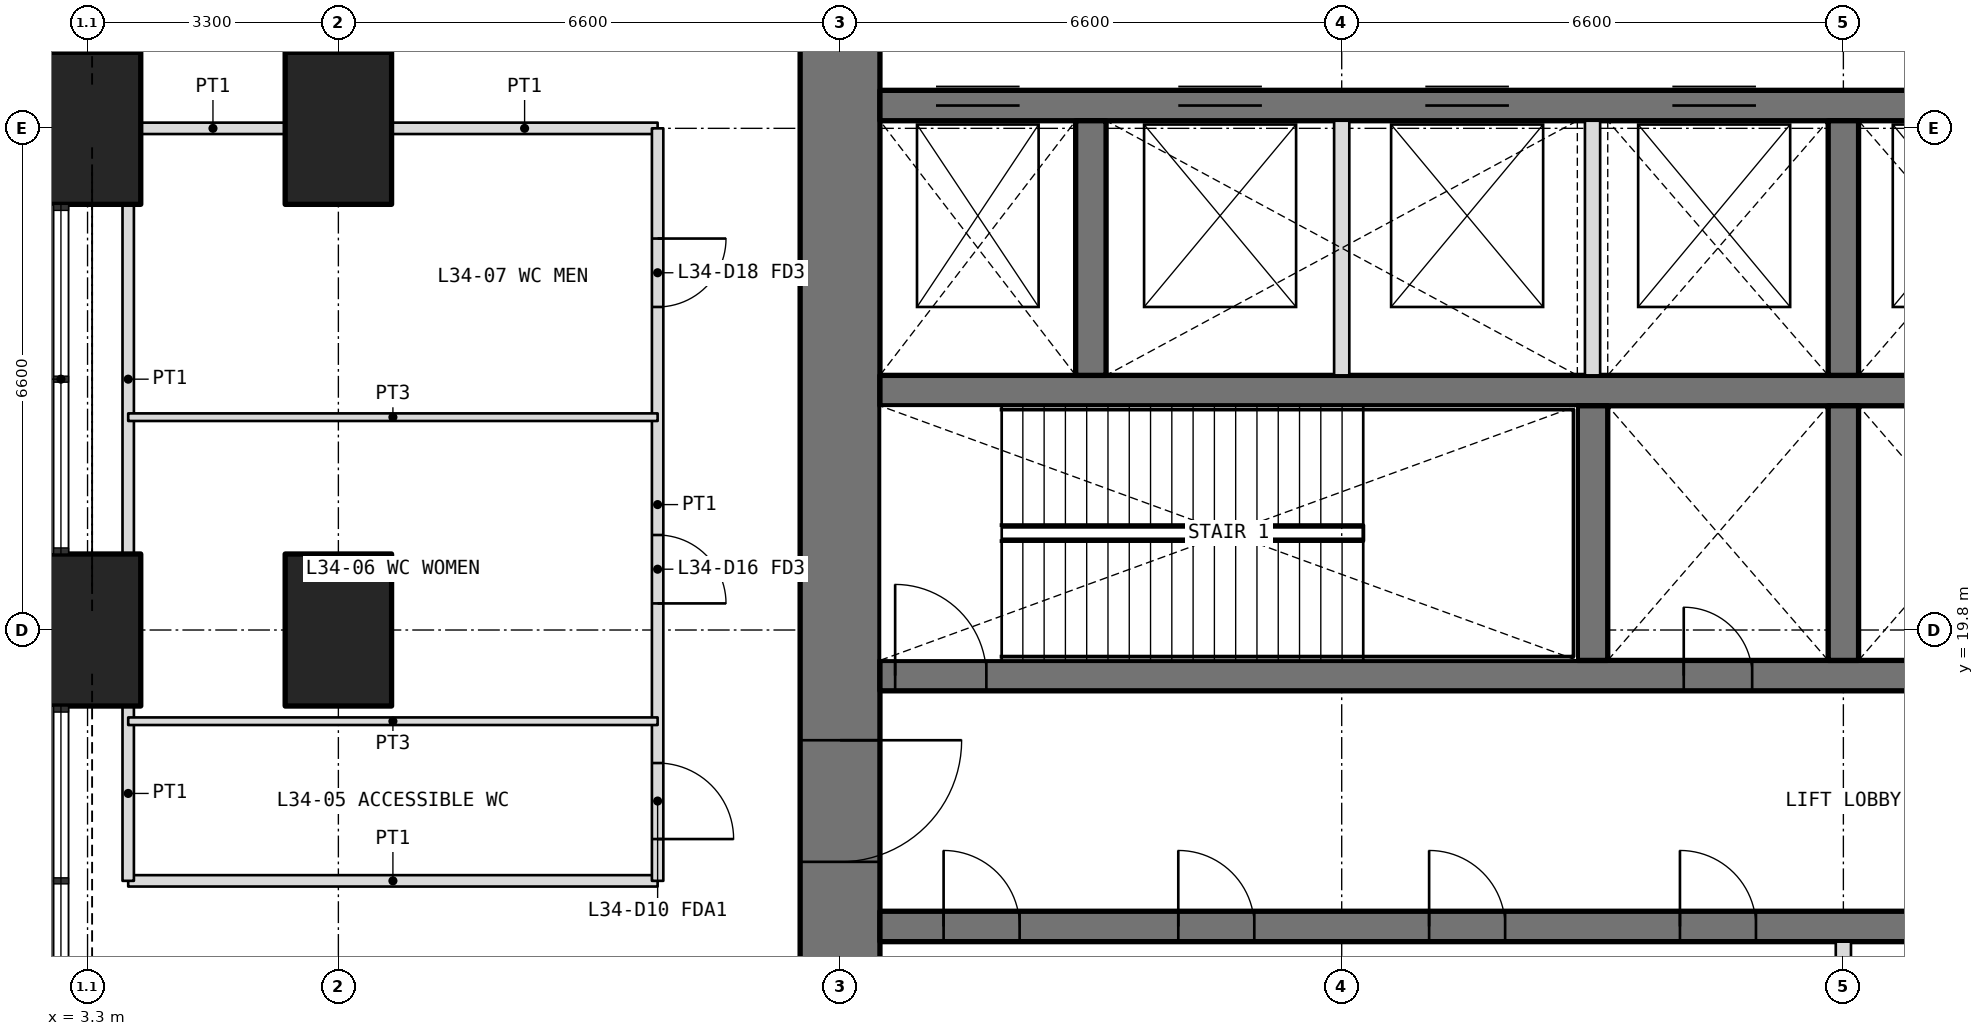
"""IFC4 building model, lengths in metres.
Left out: names, types, materials, properties, quantities, classifications, styles, units other than length and angle.
Written with IfcOpenShell. Run it as: python <this file> out.ifc"""

import sys

from ifc_helpers import new_model, si_unit, direction, frame, frame_2d, origin, origin_2d, place, context, subcontext, project, spatial, rectangle, extrude, element, fill, save


model = new_model("IFC4")
c1 = context("Model", 3, precision=1e-05, world=origin(), true_north=direction((0.0, 1.0)))
c2 = subcontext(c1, "Body", "Model", "MODEL_VIEW")
j1 = project(units=[si_unit("LENGTHUNIT", "METRE"), si_unit("PLANEANGLEUNIT", "RADIAN")], contexts=[c1])
p1 = place(None, origin())
s1 = spatial("IfcSite", under=j1, at=p1, CompositionType="ELEMENT")
p2 = place(p1, origin())
s2 = spatial("IfcBuilding", under=s1, at=p2, CompositionType="ELEMENT")
p3 = place(p2, frame((0.0, 0.0, 149.4)))
s3 = spatial("IfcBuildingStorey", under=s2, at=p3, CompositionType="ELEMENT", Elevation=149.4)
for number, where, z_axis, x_axis in (
    (1, (3.3, 19.8, 0.0), (0.0, 0.0, 1.0), (0.0, 1.0, 0.0)),
    (2, (3.3, 26.4, 0.0), (0.0, 0.0, 1.0), (0.0, 1.0, 0.0)),
    (3, (6.6, 19.8, 0.0), (0.0, 0.0, 1.0), (0.0, 1.0, 0.0)),
    (4, (6.6, 26.4, 0.0), (0.0, 0.0, 1.0), (0.0, 1.0, 0.0)),
):
    element("IfcColumn", number, at=place(p3, frame(where, z_axis=z_axis, x_axis=x_axis)), inside=s3, PredefinedType="COLUMN", context=c2, shape_type="SweptSolid", body=[
        extrude(rectangle(XDim=2.0, YDim=1.4, at=origin_2d()), origin(), (0.0, 0.0, 1.0), 6.3),
    ])
p4 = place(p3, frame((13.2, 32.475, 0.0), z_axis=(0.0, 0.0, 1.0), x_axis=(0.0, -1.0, 0.0)))
e5 = element("IfcWall", 5, at=p4, inside=s3, PredefinedType="SHEAR", context=c2, shape_type="SweptSolid", body=[
    extrude(rectangle(XDim=18.75, YDim=1.05, at=frame_2d((9.375, 0.0))), origin(), (0.0, 0.0, 1.0), 6.3),
])
p5 = place(p4, frame((14.125, 0.0, 0.0)))
e6 = element("IfcOpeningElement", 6, at=p5, cuts=e5, PredefinedType="OPENING", context=c2, shape_type="SweptSolid", body=[
    extrude(rectangle(XDim=1.6, YDim=2.1, at=frame_2d((0.8, 1.05))), frame((0.0, 0.535, 0.0), z_axis=(0.0, -1.0, 0.0), x_axis=(1.0, 0.0, 0.0)), (0.0, 0.0, 1.0), 1.07),
])
p6 = place(p4, frame((3.325, 0.0, 0.0)))
e7 = element("IfcOpeningElement", 7, at=p6, cuts=e5, PredefinedType="OPENING", context=c2, shape_type="SweptSolid", body=[
    extrude(rectangle(XDim=1.6, YDim=2.1, at=frame_2d((0.8, 1.05))), frame((0.0, 0.535, 0.0), z_axis=(0.0, -1.0, 0.0), x_axis=(1.0, 0.0, 0.0)), (0.0, 0.0, 1.0), 1.07),
])
p7 = place(p3, frame((13.725, 15.9, 0.0), z_axis=(0.0, 0.0, 1.0), x_axis=(1.0, 0.0, 0.0)))
e8 = element("IfcWall", 8, at=p7, inside=s3, PredefinedType="SHEAR", context=c2, shape_type="SweptSolid", body=[
    extrude(rectangle(XDim=25.35, YDim=0.4, at=frame_2d((12.675, 0.0))), origin(), (0.0, 0.0, 1.0), 6.3),
])
p8 = place(p7, frame((0.837, 0.0, 0.0)))
e9 = element("IfcOpeningElement", 9, at=p8, cuts=e8, PredefinedType="OPENING", context=c2, shape_type="SweptSolid", body=[
    extrude(rectangle(XDim=1.0, YDim=2.1, at=frame_2d((0.5, 1.05))), frame((0.0, 0.21, 0.0), z_axis=(0.0, -1.0, 0.0), x_axis=(1.0, 0.0, 0.0)), (0.0, 0.0, 1.0), 0.42),
])
p9 = place(p7, frame((3.925, 0.0, 0.0)))
e10 = element("IfcOpeningElement", 10, at=p9, cuts=e8, PredefinedType="OPENING", context=c2, shape_type="SweptSolid", body=[
    extrude(rectangle(XDim=1.0, YDim=2.1, at=frame_2d((0.5, 1.05))), frame((0.0, 0.21, 0.0), z_axis=(0.0, -1.0, 0.0), x_axis=(1.0, 0.0, 0.0)), (0.0, 0.0, 1.0), 0.42),
])
p10 = place(p7, frame((7.225, 0.0, 0.0)))
e11 = element("IfcOpeningElement", 11, at=p10, cuts=e8, PredefinedType="OPENING", context=c2, shape_type="SweptSolid", body=[
    extrude(rectangle(XDim=1.0, YDim=2.1, at=frame_2d((0.5, 1.05))), frame((0.0, 0.21, 0.0), z_axis=(0.0, -1.0, 0.0), x_axis=(1.0, 0.0, 0.0)), (0.0, 0.0, 1.0), 0.42),
])
p11 = place(p7, frame((10.525, 0.0, 0.0)))
e12 = element("IfcOpeningElement", 12, at=p11, cuts=e8, PredefinedType="OPENING", context=c2, shape_type="SweptSolid", body=[
    extrude(rectangle(XDim=1.0, YDim=2.1, at=frame_2d((0.5, 1.05))), frame((0.0, 0.21, 0.0), z_axis=(0.0, -1.0, 0.0), x_axis=(1.0, 0.0, 0.0)), (0.0, 0.0, 1.0), 0.42),
])
p12 = place(p3, frame((13.725, 19.2, 0.0), z_axis=(0.0, 0.0, 1.0), x_axis=(1.0, 0.0, 0.0)))
e13 = element("IfcWall", 13, at=p12, inside=s3, PredefinedType="SHEAR", context=c2, shape_type="SweptSolid", body=[
    extrude(rectangle(XDim=25.35, YDim=0.4, at=frame_2d((12.675, 0.0))), origin(), (0.0, 0.0, 1.0), 6.3),
])
p13 = place(p12, frame((10.575, 0.0, 0.0)))
e14 = element("IfcOpeningElement", 14, at=p13, cuts=e13, PredefinedType="OPENING", context=c2, shape_type="SweptSolid", body=[
    extrude(rectangle(XDim=0.9, YDim=2.1, at=frame_2d((0.45, 1.05))), frame((0.0, 0.21, 0.0), z_axis=(0.0, -1.0, 0.0), x_axis=(1.0, 0.0, 0.0)), (0.0, 0.0, 1.0), 0.42),
])
p14 = place(p12, frame((13.875, 0.0, 0.0)))
e15 = element("IfcOpeningElement", 15, at=p14, cuts=e13, PredefinedType="OPENING", context=c2, shape_type="SweptSolid", body=[
    extrude(rectangle(XDim=0.9, YDim=2.1, at=frame_2d((0.45, 1.05))), frame((0.0, 0.21, 0.0), z_axis=(0.0, -1.0, 0.0), x_axis=(1.0, 0.0, 0.0)), (0.0, 0.0, 1.0), 0.42),
])
p15 = place(p12, frame((0.2, 0.0, 0.0)))
e16 = element("IfcOpeningElement", 16, at=p15, cuts=e13, PredefinedType="OPENING", context=c2, shape_type="SweptSolid", body=[
    extrude(rectangle(XDim=1.2, YDim=2.1, at=frame_2d((0.6, 1.05))), frame((0.0, 0.21, 0.0), z_axis=(0.0, -1.0, 0.0), x_axis=(1.0, 0.0, 0.0)), (0.0, 0.0, 1.0), 0.42),
])
p16 = place(p12, frame((23.512, 0.0, 0.0)))
e17 = element("IfcOpeningElement", 17, at=p16, cuts=e13, PredefinedType="OPENING", context=c2, shape_type="SweptSolid", body=[
    extrude(rectangle(XDim=1.1, YDim=2.1, at=frame_2d((0.55, 1.05))), frame((0.0, 0.21, 0.0), z_axis=(0.0, -1.0, 0.0), x_axis=(1.0, 0.0, 0.0)), (0.0, 0.0, 1.0), 0.42),
])
p17 = place(p12, frame((17.125, 0.0, 0.0)))
e18 = element("IfcOpeningElement", 18, at=p17, cuts=e13, PredefinedType="OPENING", context=c2, shape_type="SweptSolid", body=[
    extrude(rectangle(XDim=1.1, YDim=2.1, at=frame_2d((0.55, 1.05))), frame((0.0, 0.21, 0.0), z_axis=(0.0, -1.0, 0.0), x_axis=(1.0, 0.0, 0.0)), (0.0, 0.0, 1.0), 0.42),
])
p18 = place(p12, frame((20.325, 0.0, 0.0)))
e19 = element("IfcOpeningElement", 19, at=p18, cuts=e13, PredefinedType="OPENING", context=c2, shape_type="SweptSolid", body=[
    extrude(rectangle(XDim=1.1, YDim=2.1, at=frame_2d((0.55, 1.05))), frame((0.0, 0.21, 0.0), z_axis=(0.0, -1.0, 0.0), x_axis=(1.0, 0.0, 0.0)), (0.0, 0.0, 1.0), 0.42),
])
p19 = place(p3, frame((13.725, 22.95, 0.0), z_axis=(0.0, 0.0, 1.0), x_axis=(1.0, 0.0, 0.0)))
e20 = element("IfcWall", 20, at=p19, inside=s3, PredefinedType="SHEAR", context=c2, shape_type="SweptSolid", body=[
    extrude(rectangle(XDim=25.35, YDim=0.4, at=frame_2d((12.675, 0.0))), origin(), (0.0, 0.0, 1.0), 6.3),
])
p20 = place(p3, frame((13.725, 26.7, 0.0), z_axis=(0.0, 0.0, 1.0), x_axis=(1.0, 0.0, 0.0)))
e21 = element("IfcWall", 21, at=p20, inside=s3, PredefinedType="SHEAR", context=c2, shape_type="SweptSolid", body=[
    extrude(rectangle(XDim=25.35, YDim=0.4, at=frame_2d((12.675, 0.0))), origin(), (0.0, 0.0, 1.0), 6.3),
])
p21 = place(p20, frame((23.95, 0.0, 0.0)))
e22 = element("IfcOpeningElement", 22, at=p21, cuts=e21, PredefinedType="OPENING", context=c2, shape_type="SweptSolid", body=[
    extrude(rectangle(XDim=1.2, YDim=2.1, at=frame_2d((0.6, 1.05))), frame((0.0, 0.21, 0.0), z_axis=(0.0, -1.0, 0.0), x_axis=(1.0, 0.0, 0.0)), (0.0, 0.0, 1.0), 0.42),
])
p22 = place(p20, frame((0.738, 0.0, 0.0)))
e23 = element("IfcOpeningElement", 23, at=p22, cuts=e21, PredefinedType="OPENING", context=c2, shape_type="SweptSolid", body=[
    extrude(rectangle(XDim=1.1, YDim=2.1, at=frame_2d((0.55, 1.05))), frame((0.0, 0.21, 0.0), z_axis=(0.0, -1.0, 0.0), x_axis=(1.0, 0.0, 0.0)), (0.0, 0.0, 1.0), 0.42),
])
p23 = place(p20, frame((3.925, 0.0, 0.0)))
e24 = element("IfcOpeningElement", 24, at=p23, cuts=e21, PredefinedType="OPENING", context=c2, shape_type="SweptSolid", body=[
    extrude(rectangle(XDim=1.1, YDim=2.1, at=frame_2d((0.55, 1.05))), frame((0.0, 0.21, 0.0), z_axis=(0.0, -1.0, 0.0), x_axis=(1.0, 0.0, 0.0)), (0.0, 0.0, 1.0), 0.42),
])
p24 = place(p20, frame((7.175, 0.0, 0.0)))
e25 = element("IfcOpeningElement", 25, at=p24, cuts=e21, PredefinedType="OPENING", context=c2, shape_type="SweptSolid", body=[
    extrude(rectangle(XDim=1.1, YDim=2.1, at=frame_2d((0.55, 1.05))), frame((0.0, 0.21, 0.0), z_axis=(0.0, -1.0, 0.0), x_axis=(1.0, 0.0, 0.0)), (0.0, 0.0, 1.0), 0.42),
])
p25 = place(p20, frame((10.425, 0.0, 0.0)))
e26 = element("IfcOpeningElement", 26, at=p25, cuts=e21, PredefinedType="OPENING", context=c2, shape_type="SweptSolid", body=[
    extrude(rectangle(XDim=1.1, YDim=2.1, at=frame_2d((0.55, 1.05))), frame((0.0, 0.21, 0.0), z_axis=(0.0, -1.0, 0.0), x_axis=(1.0, 0.0, 0.0)), (0.0, 0.0, 1.0), 0.42),
])
p26 = place(p20, frame((13.775, 0.0, 0.0)))
e27 = element("IfcOpeningElement", 27, at=p26, cuts=e21, PredefinedType="OPENING", context=c2, shape_type="SweptSolid", body=[
    extrude(rectangle(XDim=1.1, YDim=2.1, at=frame_2d((0.55, 1.05))), frame((0.0, 0.21, 0.0), z_axis=(0.0, -1.0, 0.0), x_axis=(1.0, 0.0, 0.0)), (0.0, 0.0, 1.0), 0.42),
])
for number, where, z_axis, x_axis in (
    (28, (23.1, 19.4, 0.0), (0.0, 0.0, 1.0), (0.0, 1.0, 0.0)),
    (29, (26.4, 19.4, 0.0), (0.0, 0.0, 1.0), (0.0, 1.0, 0.0)),
    (30, (16.5, 23.15, 0.0), (0.0, 0.0, 1.0), (0.0, 1.0, 0.0)),
    (31, (26.4, 23.15, 0.0), (0.0, 0.0, 1.0), (0.0, 1.0, 0.0)),
):
    element("IfcWall", number, at=place(p3, frame(where, z_axis=z_axis, x_axis=x_axis)), inside=s3, PredefinedType="SHEAR", context=c2, shape_type="SweptSolid", body=[
        extrude(rectangle(XDim=3.35, YDim=0.4, at=frame_2d((1.675, 0.0))), origin(), (0.0, 0.0, 1.0), 6.3),
    ])
p27 = place(p3, frame((26.4, 13.725, 0.0), z_axis=(0.0, 0.0, 1.0), x_axis=(0.0, 1.0, 0.0)))
e32 = element("IfcWall", 32, at=p27, inside=s3, PredefinedType="PARTITIONING", context=c2, shape_type="SweptSolid", body=[
    extrude(rectangle(XDim=1.975, YDim=0.2, at=frame_2d((0.987, 0.0))), origin(), (0.0, 0.0, 1.0), 6.3),
])
for number, where, z_axis, x_axis in (
    (33, (19.8, 23.15, 0.0), (0.0, 0.0, 1.0), (0.0, 1.0, 0.0)),
    (34, (23.1, 23.15, 0.0), (0.0, 0.0, 1.0), (0.0, 1.0, 0.0)),
):
    element("IfcWall", number, at=place(p3, frame(where, z_axis=z_axis, x_axis=x_axis)), inside=s3, PredefinedType="PARTITIONING", context=c2, shape_type="SweptSolid", body=[
        extrude(rectangle(XDim=3.35, YDim=0.2, at=frame_2d((1.675, 0.0))), origin(), (0.0, 0.0, 1.0), 6.3),
    ])
p28 = place(p3, frame((10.8, 16.5, 0.0), z_axis=(0.0, 0.0, 1.0), x_axis=(-1.0, 0.0, 0.0)))
e35 = element("IfcWall", 35, at=p28, inside=s3, PredefinedType="PARTITIONING", context=c2, shape_type="SweptSolid", body=[
    extrude(rectangle(XDim=6.965, YDim=0.15, at=frame_2d((3.482, 0.0))), origin(), (0.0, 0.0, 1.0), 4.0),
])
p29 = place(p3, frame((4.0, 26.4, 0.0), z_axis=(0.0, 0.0, 1.0), x_axis=(1.0, 0.0, 0.0)))
e36 = element("IfcWall", 36, at=p29, inside=s3, PredefinedType="PARTITIONING", context=c2, shape_type="SweptSolid", body=[
    extrude(rectangle(XDim=1.9, YDim=0.15, at=frame_2d((0.95, 0.0))), origin(), (0.0, 0.0, 1.0), 4.0),
])
p30 = place(p3, frame((7.3, 26.4, 0.0), z_axis=(0.0, 0.0, 1.0), x_axis=(1.0, 0.0, 0.0)))
e37 = element("IfcWall", 37, at=p30, inside=s3, PredefinedType="PARTITIONING", context=c2, shape_type="SweptSolid", body=[
    extrude(rectangle(XDim=3.5, YDim=0.15, at=frame_2d((1.75, 0.0))), origin(), (0.0, 0.0, 1.0), 4.0),
])
p31 = place(p3, frame((3.835, 16.5, 0.0), z_axis=(0.0, 0.0, 1.0), x_axis=(0.0, 1.0, 0.0)))
e38 = element("IfcWall", 38, at=p31, inside=s3, PredefinedType="PARTITIONING", context=c2, shape_type="SweptSolid", body=[
    extrude(rectangle(XDim=2.3, YDim=0.15, at=frame_2d((1.15, 0.0))), origin(), (0.0, 0.0, 1.0), 4.0),
])
p32 = place(p3, frame((3.835, 20.8, 0.0), z_axis=(0.0, 0.0, 1.0), x_axis=(0.0, 1.0, 0.0)))
e39 = element("IfcWall", 39, at=p32, inside=s3, PredefinedType="PARTITIONING", context=c2, shape_type="SweptSolid", body=[
    extrude(rectangle(XDim=4.6, YDim=0.15, at=frame_2d((2.3, 0.0))), origin(), (0.0, 0.0, 1.0), 4.0),
])
p33 = place(p3, frame((10.8, 26.4, 0.0), z_axis=(0.0, 0.0, 1.0), x_axis=(0.0, -1.0, 0.0)))
e40 = element("IfcWall", 40, at=p33, inside=s3, PredefinedType="PARTITIONING", context=c2, shape_type="SweptSolid", body=[
    extrude(rectangle(XDim=9.9, YDim=0.15, at=frame_2d((4.95, 0.0))), origin(), (0.0, 0.0, 1.0), 4.0),
])
p34 = place(p33, frame((8.35, 0.0, 0.0)))
e41 = element("IfcOpeningElement", 41, at=p34, cuts=e40, PredefinedType="OPENING", context=c2, shape_type="SweptSolid", body=[
    extrude(rectangle(XDim=1.0, YDim=2.1, at=frame_2d((0.5, 1.05))), frame((0.0, 0.085, 0.0), z_axis=(0.0, -1.0, 0.0), x_axis=(1.0, 0.0, 0.0)), (0.0, 0.0, 1.0), 0.17),
])
p35 = place(p33, frame((5.35, 0.0, 0.0)))
e42 = element("IfcOpeningElement", 42, at=p35, cuts=e40, PredefinedType="OPENING", context=c2, shape_type="SweptSolid", body=[
    extrude(rectangle(XDim=0.9, YDim=2.1, at=frame_2d((0.45, 1.05))), frame((0.0, 0.085, 0.0), z_axis=(0.0, -1.0, 0.0), x_axis=(1.0, 0.0, 0.0)), (0.0, 0.0, 1.0), 0.17),
])
p36 = place(p33, frame((1.45, 0.0, 0.0)))
e43 = element("IfcOpeningElement", 43, at=p36, cuts=e40, PredefinedType="OPENING", context=c2, shape_type="SweptSolid", body=[
    extrude(rectangle(XDim=0.9, YDim=2.1, at=frame_2d((0.45, 1.05))), frame((0.0, 0.085, 0.0), z_axis=(0.0, -1.0, 0.0), x_axis=(1.0, 0.0, 0.0)), (0.0, 0.0, 1.0), 0.17),
])
for number, where, z_axis, x_axis in (
    (44, (3.835, 18.6, 0.0), (0.0, 0.0, 1.0), (1.0, 0.0, 0.0)),
    (45, (3.835, 22.6, 0.0), (0.0, 0.0, 1.0), (1.0, 0.0, 0.0)),
):
    element("IfcWall", number, at=place(p3, frame(where, z_axis=z_axis, x_axis=x_axis)), inside=s3, PredefinedType="PARTITIONING", context=c2, shape_type="SweptSolid", body=[
        extrude(rectangle(XDim=6.965, YDim=0.1, at=frame_2d((3.482, 0.0))), origin(), (0.0, 0.0, 1.0), 4.0),
    ])
p37 = place(p34, origin())
e46 = element("IfcDoor", 46, at=p37, inside=s3, OperationType="SINGLE_SWING_RIGHT", PredefinedType="DOOR", context=c2, shape_type="SweptSolid", body=[
    extrude(rectangle(XDim=1.0, YDim=2.1, at=frame_2d((0.5, 1.05))), frame((0.0, 0.025, 0.0), z_axis=(0.0, -1.0, 0.0), x_axis=(1.0, 0.0, 0.0)), (0.0, 0.0, 1.0), 0.05),
])
fill(e41, e46)
p38 = place(p35, origin())
e47 = element("IfcDoor", 47, at=p38, inside=s3, OperationType="SINGLE_SWING_RIGHT", PredefinedType="DOOR", context=c2, shape_type="SweptSolid", body=[
    extrude(rectangle(XDim=0.9, YDim=2.1, at=frame_2d((0.45, 1.05))), frame((0.0, 0.025, 0.0), z_axis=(0.0, -1.0, 0.0), x_axis=(1.0, 0.0, 0.0)), (0.0, 0.0, 1.0), 0.05),
])
fill(e42, e47)
p39 = place(p36, origin())
e48 = element("IfcDoor", 48, at=p39, inside=s3, OperationType="SINGLE_SWING_LEFT", PredefinedType="DOOR", context=c2, shape_type="SweptSolid", body=[
    extrude(rectangle(XDim=0.9, YDim=2.1, at=frame_2d((0.45, 1.05))), frame((0.0, 0.025, 0.0), z_axis=(0.0, -1.0, 0.0), x_axis=(1.0, 0.0, 0.0)), (0.0, 0.0, 1.0), 0.05),
])
fill(e43, e48)
p40 = place(p13, origin())
e49 = element("IfcDoor", 49, at=p40, inside=s3, OperationType="SINGLE_SWING_LEFT", PredefinedType="DOOR", context=c2, shape_type="SweptSolid", body=[
    extrude(rectangle(XDim=0.9, YDim=2.1, at=frame_2d((0.45, 1.05))), frame((0.0, 0.025, 0.0), z_axis=(0.0, -1.0, 0.0), x_axis=(1.0, 0.0, 0.0)), (0.0, 0.0, 1.0), 0.05),
])
fill(e14, e49)
p41 = place(p8, origin())
e50 = element("IfcDoor", 50, at=p41, inside=s3, OperationType="SINGLE_SWING_LEFT", PredefinedType="DOOR", context=c2, shape_type="SweptSolid", body=[
    extrude(rectangle(XDim=1.0, YDim=2.1, at=frame_2d((0.5, 1.05))), frame((0.0, 0.025, 0.0), z_axis=(0.0, -1.0, 0.0), x_axis=(1.0, 0.0, 0.0)), (0.0, 0.0, 1.0), 0.05),
])
fill(e9, e50)
p42 = place(p9, origin())
e51 = element("IfcDoor", 51, at=p42, inside=s3, OperationType="SINGLE_SWING_LEFT", PredefinedType="DOOR", context=c2, shape_type="SweptSolid", body=[
    extrude(rectangle(XDim=1.0, YDim=2.1, at=frame_2d((0.5, 1.05))), frame((0.0, 0.025, 0.0), z_axis=(0.0, -1.0, 0.0), x_axis=(1.0, 0.0, 0.0)), (0.0, 0.0, 1.0), 0.05),
])
fill(e10, e51)
p43 = place(p10, origin())
e52 = element("IfcDoor", 52, at=p43, inside=s3, OperationType="SINGLE_SWING_LEFT", PredefinedType="DOOR", context=c2, shape_type="SweptSolid", body=[
    extrude(rectangle(XDim=1.0, YDim=2.1, at=frame_2d((0.5, 1.05))), frame((0.0, 0.025, 0.0), z_axis=(0.0, -1.0, 0.0), x_axis=(1.0, 0.0, 0.0)), (0.0, 0.0, 1.0), 0.05),
])
fill(e11, e52)
p44 = place(p11, origin())
e53 = element("IfcDoor", 53, at=p44, inside=s3, OperationType="SINGLE_SWING_LEFT", PredefinedType="DOOR", context=c2, shape_type="SweptSolid", body=[
    extrude(rectangle(XDim=1.0, YDim=2.1, at=frame_2d((0.5, 1.05))), frame((0.0, 0.025, 0.0), z_axis=(0.0, -1.0, 0.0), x_axis=(1.0, 0.0, 0.0)), (0.0, 0.0, 1.0), 0.05),
])
fill(e12, e53)
p45 = place(p15, origin())
e54 = element("IfcDoor", 54, at=p45, inside=s3, OperationType="SINGLE_SWING_LEFT", PredefinedType="DOOR", context=c2, shape_type="SweptSolid", body=[
    extrude(rectangle(XDim=1.2, YDim=2.1, at=frame_2d((0.6, 1.05))), frame((0.0, 0.025, 0.0), z_axis=(0.0, -1.0, 0.0), x_axis=(1.0, 0.0, 0.0)), (0.0, 0.0, 1.0), 0.05),
])
fill(e16, e54)
p46 = place(p5, origin())
e55 = element("IfcDoor", 55, at=p46, inside=s3, OperationType="DOUBLE_DOOR_DOUBLE_SWING", PredefinedType="DOOR", context=c2, shape_type="SweptSolid", body=[
    extrude(rectangle(XDim=1.6, YDim=2.1, at=frame_2d((0.8, 1.05))), frame((0.0, 0.025, 0.0), z_axis=(0.0, -1.0, 0.0), x_axis=(1.0, 0.0, 0.0)), (0.0, 0.0, 1.0), 0.05),
])
fill(e6, e55)
p47 = place(p22, origin())
e56 = element("IfcDoor", 56, at=p47, inside=s3, OperationType="DOUBLE_DOOR_SLIDING", PredefinedType="DOOR", context=c2, shape_type="SweptSolid", body=[
    extrude(rectangle(XDim=1.1, YDim=2.1, at=frame_2d((0.55, 1.05))), frame((0.0, 0.025, 0.0), z_axis=(0.0, -1.0, 0.0), x_axis=(1.0, 0.0, 0.0)), (0.0, 0.0, 1.0), 0.05),
])
fill(e23, e56)
p48 = place(p23, origin())
e57 = element("IfcDoor", 57, at=p48, inside=s3, OperationType="DOUBLE_DOOR_SLIDING", PredefinedType="DOOR", context=c2, shape_type="SweptSolid", body=[
    extrude(rectangle(XDim=1.1, YDim=2.1, at=frame_2d((0.55, 1.05))), frame((0.0, 0.025, 0.0), z_axis=(0.0, -1.0, 0.0), x_axis=(1.0, 0.0, 0.0)), (0.0, 0.0, 1.0), 0.05),
])
fill(e24, e57)
p49 = place(p24, origin())
e58 = element("IfcDoor", 58, at=p49, inside=s3, OperationType="DOUBLE_DOOR_SLIDING", PredefinedType="DOOR", context=c2, shape_type="SweptSolid", body=[
    extrude(rectangle(XDim=1.1, YDim=2.1, at=frame_2d((0.55, 1.05))), frame((0.0, 0.025, 0.0), z_axis=(0.0, -1.0, 0.0), x_axis=(1.0, 0.0, 0.0)), (0.0, 0.0, 1.0), 0.05),
])
fill(e25, e58)
p50 = place(p25, origin())
e59 = element("IfcDoor", 59, at=p50, inside=s3, OperationType="DOUBLE_DOOR_SLIDING", PredefinedType="DOOR", context=c2, shape_type="SweptSolid", body=[
    extrude(rectangle(XDim=1.1, YDim=2.1, at=frame_2d((0.55, 1.05))), frame((0.0, 0.025, 0.0), z_axis=(0.0, -1.0, 0.0), x_axis=(1.0, 0.0, 0.0)), (0.0, 0.0, 1.0), 0.05),
])
fill(e26, e59)
save(model, sys.argv[1])
